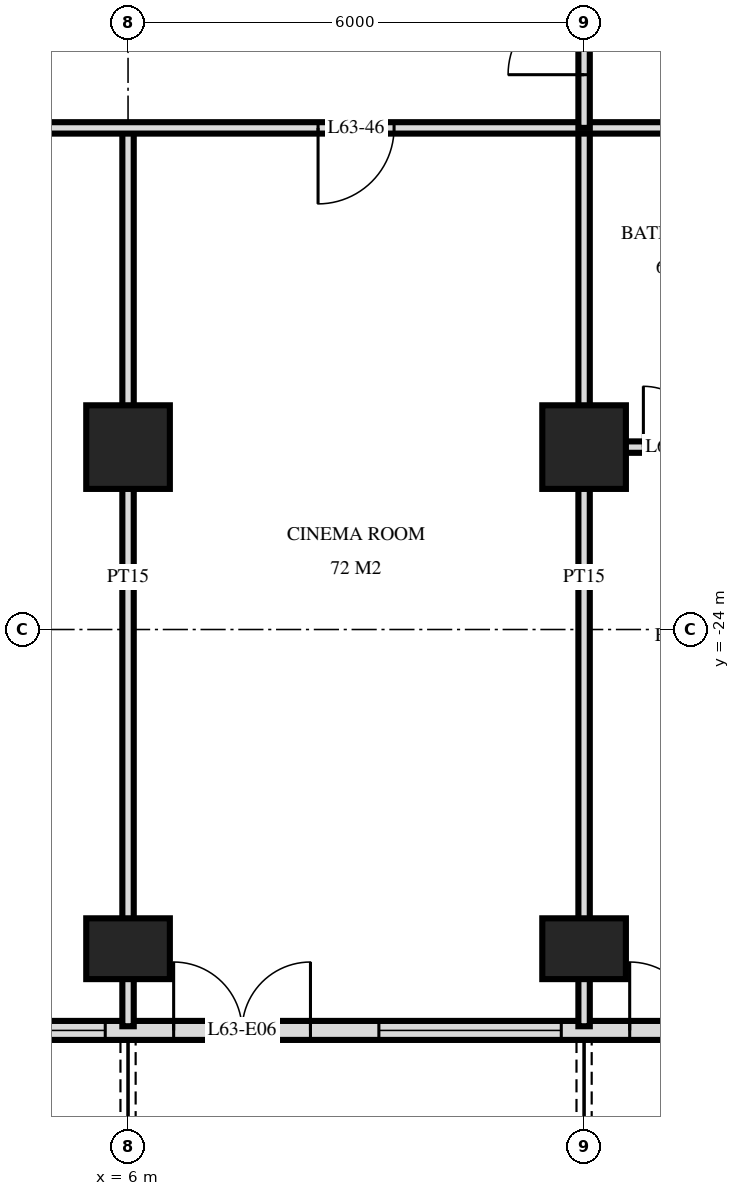
"""IFC4 building model, lengths in metres.
Left out: names, types, materials, properties, quantities, classifications, styles, units other than length and angle.
Written with IfcOpenShell. Run it as: python <this file> out.ifc"""

import sys

from ifc_helpers import new_model, si_unit, direction, frame, frame_2d, origin, origin_2d, place, context, subcontext, project, spatial, rectangle, extrude, element, fill, save


model = new_model("IFC4")
c1 = context("Model", 3, precision=1e-05, world=origin(), true_north=direction((0.0, 1.0)))
c2 = subcontext(c1, "Body", "Model", "MODEL_VIEW")
j1 = project(units=[si_unit("LENGTHUNIT", "METRE"), si_unit("PLANEANGLEUNIT", "RADIAN")], contexts=[c1])
p1 = place(None, origin())
s1 = spatial("IfcSite", under=j1, at=p1, CompositionType="ELEMENT")
p2 = place(p1, origin())
s2 = spatial("IfcBuilding", under=s1, at=p2, CompositionType="ELEMENT")
p3 = place(p2, frame((0.0, 0.0, 239.6)))
s3 = spatial("IfcBuildingStorey", under=s2, at=p3, CompositionType="ELEMENT", Elevation=239.6)
p4 = place(p3, frame((6.0, -28.2, 0.0), z_axis=(0.0, 0.0, 1.0), x_axis=(1.0, 0.0, 0.0)))
e1 = element("IfcColumn", 1, at=p4, inside=s3, PredefinedType="COLUMN", context=c2, shape_type="SweptSolid", body=[
    extrude(rectangle(XDim=1.1, YDim=0.8, at=origin_2d()), origin(), (0.0, 0.0, 1.0), 3.5),
])
p5 = place(p3, frame((6.0, -21.6, 0.0), z_axis=(0.0, 0.0, 1.0), x_axis=(1.0, 0.0, 0.0)))
e2 = element("IfcColumn", 2, at=p5, inside=s3, PredefinedType="COLUMN", context=c2, shape_type="SweptSolid", body=[
    extrude(rectangle(XDim=1.1, YDim=1.1, at=origin_2d()), origin(), (0.0, 0.0, 1.0), 3.5),
])
p6 = place(p3, frame((12.0, -28.2, 0.0), z_axis=(0.0, 0.0, 1.0), x_axis=(1.0, 0.0, 0.0)))
e3 = element("IfcColumn", 3, at=p6, inside=s3, PredefinedType="COLUMN", context=c2, shape_type="SweptSolid", body=[
    extrude(rectangle(XDim=1.1, YDim=0.8, at=origin_2d()), origin(), (0.0, 0.0, 1.0), 3.5),
])
p7 = place(p3, frame((12.0, -21.6, 0.0), z_axis=(0.0, 0.0, 1.0), x_axis=(1.0, 0.0, 0.0)))
e4 = element("IfcColumn", 4, at=p7, inside=s3, PredefinedType="COLUMN", context=c2, shape_type="SweptSolid", body=[
    extrude(rectangle(XDim=1.1, YDim=1.1, at=origin_2d()), origin(), (0.0, 0.0, 1.0), 3.5),
])
p8 = place(p3, frame((-22.475, -29.275, 0.0), z_axis=(0.0, 0.0, 1.0), x_axis=(1.0, 0.0, 0.0)))
e5 = element("IfcWall", 5, at=p8, inside=s3, PredefinedType="SOLIDWALL", context=c2, shape_type="SweptSolid", body=[
    extrude(rectangle(XDim=44.951, YDim=0.25, at=frame_2d((22.475, 0.0))), origin(), (0.0, 0.0, 1.0), 3.22),
])
p9 = place(p8, frame((0.575, 0.0, 0.0)))
e6 = element("IfcOpeningElement", 6, at=p9, cuts=e5, PredefinedType="OPENING", context=c2, shape_type="SweptSolid", body=[
    extrude(rectangle(XDim=1.8, YDim=2.4, at=frame_2d((0.9, 1.2))), frame((0.0, 0.135, 0.0), z_axis=(0.0, -1.0, 0.0), x_axis=(1.0, 0.0, 0.0)), (0.0, 0.0, 1.0), 0.27),
])
p10 = place(p8, frame((4.775, 0.0, 0.9)))
e7 = element("IfcOpeningElement", 7, at=p10, cuts=e5, PredefinedType="OPENING", context=c2, shape_type="SweptSolid", body=[
    extrude(rectangle(XDim=2.4, YDim=1.5, at=frame_2d((1.2, 0.75))), frame((0.0, 0.135, 0.0), z_axis=(0.0, -1.0, 0.0), x_axis=(1.0, 0.0, 0.0)), (0.0, 0.0, 1.0), 0.27),
])
p11 = place(p8, frame((8.075, 0.0, 0.0)))
e8 = element("IfcOpeningElement", 8, at=p11, cuts=e5, PredefinedType="OPENING", context=c2, shape_type="SweptSolid", body=[
    extrude(rectangle(XDim=1.8, YDim=2.4, at=frame_2d((0.9, 1.2))), frame((0.0, 0.135, 0.0), z_axis=(0.0, -1.0, 0.0), x_axis=(1.0, 0.0, 0.0)), (0.0, 0.0, 1.0), 0.27),
])
p12 = place(p8, frame((11.075, 0.0, 0.0)))
e9 = element("IfcOpeningElement", 9, at=p12, cuts=e5, PredefinedType="OPENING", context=c2, shape_type="SweptSolid", body=[
    extrude(rectangle(XDim=1.8, YDim=2.4, at=frame_2d((0.9, 1.2))), frame((0.0, 0.135, 0.0), z_axis=(0.0, -1.0, 0.0), x_axis=(1.0, 0.0, 0.0)), (0.0, 0.0, 1.0), 0.27),
])
p13 = place(p8, frame((13.775, 0.0, 0.9)))
e10 = element("IfcOpeningElement", 10, at=p13, cuts=e5, PredefinedType="OPENING", context=c2, shape_type="SweptSolid", body=[
    extrude(rectangle(XDim=2.4, YDim=1.5, at=frame_2d((1.2, 0.75))), frame((0.0, 0.135, 0.0), z_axis=(0.0, -1.0, 0.0), x_axis=(1.0, 0.0, 0.0)), (0.0, 0.0, 1.0), 0.27),
])
p14 = place(p8, frame((16.775, 0.0, 0.9)))
e11 = element("IfcOpeningElement", 11, at=p14, cuts=e5, PredefinedType="OPENING", context=c2, shape_type="SweptSolid", body=[
    extrude(rectangle(XDim=2.4, YDim=1.5, at=frame_2d((1.2, 0.75))), frame((0.0, 0.135, 0.0), z_axis=(0.0, -1.0, 0.0), x_axis=(1.0, 0.0, 0.0)), (0.0, 0.0, 1.0), 0.27),
])
p15 = place(p8, frame((20.075, 0.0, 0.0)))
e12 = element("IfcOpeningElement", 12, at=p15, cuts=e5, PredefinedType="OPENING", context=c2, shape_type="SweptSolid", body=[
    extrude(rectangle(XDim=1.8, YDim=2.4, at=frame_2d((0.9, 1.2))), frame((0.0, 0.135, 0.0), z_axis=(0.0, -1.0, 0.0), x_axis=(1.0, 0.0, 0.0)), (0.0, 0.0, 1.0), 0.27),
])
p16 = place(p8, frame((23.075, 0.0, 0.0)))
e13 = element("IfcOpeningElement", 13, at=p16, cuts=e5, PredefinedType="OPENING", context=c2, shape_type="SweptSolid", body=[
    extrude(rectangle(XDim=1.8, YDim=2.4, at=frame_2d((0.9, 1.2))), frame((0.0, 0.135, 0.0), z_axis=(0.0, -1.0, 0.0), x_axis=(1.0, 0.0, 0.0)), (0.0, 0.0, 1.0), 0.27),
])
p17 = place(p8, frame((25.775, 0.0, 0.9)))
e14 = element("IfcOpeningElement", 14, at=p17, cuts=e5, PredefinedType="OPENING", context=c2, shape_type="SweptSolid", body=[
    extrude(rectangle(XDim=2.4, YDim=1.5, at=frame_2d((1.2, 0.75))), frame((0.0, 0.135, 0.0), z_axis=(0.0, -1.0, 0.0), x_axis=(1.0, 0.0, 0.0)), (0.0, 0.0, 1.0), 0.27),
])
p18 = place(p8, frame((29.075, 0.0, 0.0)))
e15 = element("IfcOpeningElement", 15, at=p18, cuts=e5, PredefinedType="OPENING", context=c2, shape_type="SweptSolid", body=[
    extrude(rectangle(XDim=1.8, YDim=2.4, at=frame_2d((0.9, 1.2))), frame((0.0, 0.135, 0.0), z_axis=(0.0, -1.0, 0.0), x_axis=(1.0, 0.0, 0.0)), (0.0, 0.0, 1.0), 0.27),
])
p19 = place(p8, frame((31.775, 0.0, 0.9)))
e16 = element("IfcOpeningElement", 16, at=p19, cuts=e5, PredefinedType="OPENING", context=c2, shape_type="SweptSolid", body=[
    extrude(rectangle(XDim=2.4, YDim=1.5, at=frame_2d((1.2, 0.75))), frame((0.0, 0.135, 0.0), z_axis=(0.0, -1.0, 0.0), x_axis=(1.0, 0.0, 0.0)), (0.0, 0.0, 1.0), 0.27),
])
p20 = place(p8, frame((35.075, 0.0, 0.0)))
e17 = element("IfcOpeningElement", 17, at=p20, cuts=e5, PredefinedType="OPENING", context=c2, shape_type="SweptSolid", body=[
    extrude(rectangle(XDim=1.8, YDim=2.4, at=frame_2d((0.9, 1.2))), frame((0.0, 0.135, 0.0), z_axis=(0.0, -1.0, 0.0), x_axis=(1.0, 0.0, 0.0)), (0.0, 0.0, 1.0), 0.27),
])
p21 = place(p8, frame((41.075, 0.0, 0.0)))
e18 = element("IfcOpeningElement", 18, at=p21, cuts=e5, PredefinedType="OPENING", context=c2, shape_type="SweptSolid", body=[
    extrude(rectangle(XDim=1.8, YDim=2.4, at=frame_2d((0.9, 1.2))), frame((0.0, 0.135, 0.0), z_axis=(0.0, -1.0, 0.0), x_axis=(1.0, 0.0, 0.0)), (0.0, 0.0, 1.0), 0.27),
])
p22 = place(p3, frame((12.0, -17.4, 0.0), z_axis=(0.0, 0.0, 1.0), x_axis=(0.0, 1.0, 0.0)))
e19 = element("IfcWall", 19, at=p22, inside=s3, PredefinedType="PARTITIONING", context=c2, shape_type="SweptSolid", body=[
    extrude(rectangle(XDim=2.35, YDim=0.15, at=frame_2d((1.175, 0.0))), origin(), (0.0, 0.0, 1.0), 3.22),
])
p23 = place(p22, frame((0.7, 0.0, 0.0)))
e20 = element("IfcOpeningElement", 20, at=p23, cuts=e19, PredefinedType="OPENING", context=c2, shape_type="SweptSolid", body=[
    extrude(rectangle(XDim=1.0, YDim=2.1, at=frame_2d((0.5, 1.05))), frame((0.0, 0.085, 0.0), z_axis=(0.0, -1.0, 0.0), x_axis=(1.0, 0.0, 0.0)), (0.0, 0.0, 1.0), 0.17),
])
for number, where, z_axis, x_axis in (
    (21, (12.0, -29.22, 0.0), (0.0, 0.0, 1.0), (0.0, 1.0, 0.0)),
    (22, (6.0, -29.22, 0.0), (0.0, 0.0, 1.0), (0.0, 1.0, 0.0)),
):
    element("IfcWall", number, at=place(p3, frame(where, z_axis=z_axis, x_axis=x_axis)), inside=s3, PredefinedType="PARTITIONING", context=c2, shape_type="SweptSolid", body=[
        extrude(rectangle(XDim=11.82, YDim=0.15, at=frame_2d((5.91, 0.0))), origin(), (0.0, 0.0, 1.0), 3.22),
    ])
p24 = place(p3, frame((12.0, -21.6, 0.0), z_axis=(0.0, 0.0, 1.0), x_axis=(1.0, 0.0, 0.0)))
e23 = element("IfcWall", 23, at=p24, inside=s3, PredefinedType="PARTITIONING", context=c2, shape_type="SweptSolid", body=[
    extrude(rectangle(XDim=8.4, YDim=0.15, at=frame_2d((4.2, 0.0))), origin(), (0.0, 0.0, 1.0), 3.22),
])
p25 = place(p24, frame((0.78, 0.0, 0.0)))
e24 = element("IfcOpeningElement", 24, at=p25, cuts=e23, PredefinedType="OPENING", context=c2, shape_type="SweptSolid", body=[
    extrude(rectangle(XDim=0.8, YDim=2.1, at=frame_2d((0.4, 1.05))), frame((0.0, 0.085, 0.0), z_axis=(0.0, -1.0, 0.0), x_axis=(1.0, 0.0, 0.0)), (0.0, 0.0, 1.0), 0.17),
])
p26 = place(p24, frame((2.98, 0.0, 0.0)))
e25 = element("IfcOpeningElement", 25, at=p26, cuts=e23, PredefinedType="OPENING", context=c2, shape_type="SweptSolid", body=[
    extrude(rectangle(XDim=0.9, YDim=2.1, at=frame_2d((0.45, 1.05))), frame((0.0, 0.085, 0.0), z_axis=(0.0, -1.0, 0.0), x_axis=(1.0, 0.0, 0.0)), (0.0, 0.0, 1.0), 0.17),
])
p27 = place(p3, frame((-26.82, -17.4, 0.0), z_axis=(0.0, 0.0, 1.0), x_axis=(1.0, 0.0, 0.0)))
e26 = element("IfcWall", 26, at=p27, inside=s3, PredefinedType="PARTITIONING", context=c2, shape_type="SweptSolid", body=[
    extrude(rectangle(XDim=53.64, YDim=0.15, at=frame_2d((26.82, 0.0))), origin(), (0.0, 0.0, 1.0), 3.22),
])
p28 = place(p27, frame((11.97, 0.0, 0.0)))
e27 = element("IfcOpeningElement", 27, at=p28, cuts=e26, PredefinedType="OPENING", context=c2, shape_type="SweptSolid", body=[
    extrude(rectangle(XDim=1.0, YDim=2.1, at=frame_2d((0.5, 1.05))), frame((0.0, 0.085, 0.0), z_axis=(0.0, -1.0, 0.0), x_axis=(1.0, 0.0, 0.0)), (0.0, 0.0, 1.0), 0.17),
])
p29 = place(p27, frame((3.92, 0.0, 0.0)))
e28 = element("IfcOpeningElement", 28, at=p29, cuts=e26, PredefinedType="OPENING", context=c2, shape_type="SweptSolid", body=[
    extrude(rectangle(XDim=1.0, YDim=2.1, at=frame_2d((0.5, 1.05))), frame((0.0, 0.085, 0.0), z_axis=(0.0, -1.0, 0.0), x_axis=(1.0, 0.0, 0.0)), (0.0, 0.0, 1.0), 0.17),
])
p30 = place(p27, frame((5.72, 0.0, 0.0)))
e29 = element("IfcOpeningElement", 29, at=p30, cuts=e26, PredefinedType="OPENING", context=c2, shape_type="SweptSolid", body=[
    extrude(rectangle(XDim=1.0, YDim=2.1, at=frame_2d((0.5, 1.05))), frame((0.0, 0.085, 0.0), z_axis=(0.0, -1.0, 0.0), x_axis=(1.0, 0.0, 0.0)), (0.0, 0.0, 1.0), 0.17),
])
p31 = place(p27, frame((47.72, 0.0, 0.0)))
e30 = element("IfcOpeningElement", 30, at=p31, cuts=e26, PredefinedType="OPENING", context=c2, shape_type="SweptSolid", body=[
    extrude(rectangle(XDim=1.0, YDim=2.1, at=frame_2d((0.5, 1.05))), frame((0.0, 0.085, 0.0), z_axis=(0.0, -1.0, 0.0), x_axis=(1.0, 0.0, 0.0)), (0.0, 0.0, 1.0), 0.17),
])
p32 = place(p27, frame((51.02, 0.0, 0.0)))
e31 = element("IfcOpeningElement", 31, at=p32, cuts=e26, PredefinedType="OPENING", context=c2, shape_type="SweptSolid", body=[
    extrude(rectangle(XDim=1.0, YDim=2.1, at=frame_2d((0.5, 1.05))), frame((0.0, 0.085, 0.0), z_axis=(0.0, -1.0, 0.0), x_axis=(1.0, 0.0, 0.0)), (0.0, 0.0, 1.0), 0.17),
])
p33 = place(p27, frame((17.32, 0.0, 0.0)))
e32 = element("IfcOpeningElement", 32, at=p33, cuts=e26, PredefinedType="OPENING", context=c2, shape_type="SweptSolid", body=[
    extrude(rectangle(XDim=1.0, YDim=2.1, at=frame_2d((0.5, 1.05))), frame((0.0, 0.085, 0.0), z_axis=(0.0, -1.0, 0.0), x_axis=(1.0, 0.0, 0.0)), (0.0, 0.0, 1.0), 0.17),
])
p34 = place(p27, frame((23.32, 0.0, 0.0)))
e33 = element("IfcOpeningElement", 33, at=p34, cuts=e26, PredefinedType="OPENING", context=c2, shape_type="SweptSolid", body=[
    extrude(rectangle(XDim=1.0, YDim=2.1, at=frame_2d((0.5, 1.05))), frame((0.0, 0.085, 0.0), z_axis=(0.0, -1.0, 0.0), x_axis=(1.0, 0.0, 0.0)), (0.0, 0.0, 1.0), 0.17),
])
p35 = place(p27, frame((29.32, 0.0, 0.0)))
e34 = element("IfcOpeningElement", 34, at=p35, cuts=e26, PredefinedType="OPENING", context=c2, shape_type="SweptSolid", body=[
    extrude(rectangle(XDim=1.0, YDim=2.1, at=frame_2d((0.5, 1.05))), frame((0.0, 0.085, 0.0), z_axis=(0.0, -1.0, 0.0), x_axis=(1.0, 0.0, 0.0)), (0.0, 0.0, 1.0), 0.17),
])
p36 = place(p27, frame((35.32, 0.0, 0.0)))
e35 = element("IfcOpeningElement", 35, at=p36, cuts=e26, PredefinedType="OPENING", context=c2, shape_type="SweptSolid", body=[
    extrude(rectangle(XDim=1.0, YDim=2.1, at=frame_2d((0.5, 1.05))), frame((0.0, 0.085, 0.0), z_axis=(0.0, -1.0, 0.0), x_axis=(1.0, 0.0, 0.0)), (0.0, 0.0, 1.0), 0.17),
])
p37 = place(p17, origin())
e36 = element("IfcWindow", 36, at=p37, inside=s3, PartitioningType="SINGLE_PANEL", PredefinedType="WINDOW", context=c2, shape_type="SweptSolid", body=[
    extrude(rectangle(XDim=2.4, YDim=1.5, at=frame_2d((1.2, 0.75))), frame((0.0, 0.03, 0.0), z_axis=(0.0, -1.0, 0.0), x_axis=(1.0, 0.0, 0.0)), (0.0, 0.0, 1.0), 0.06),
])
fill(e14, e36)
p38 = place(p18, origin())
e37 = element("IfcDoor", 37, at=p38, inside=s3, OperationType="DOUBLE_DOOR_SINGLE_SWING", PredefinedType="DOOR", context=c2, shape_type="SweptSolid", body=[
    extrude(rectangle(XDim=1.8, YDim=2.4, at=frame_2d((0.9, 1.2))), frame((0.0, 0.025, 0.0), z_axis=(0.0, -1.0, 0.0), x_axis=(1.0, 0.0, 0.0)), (0.0, 0.0, 1.0), 0.05),
])
fill(e15, e37)
p39 = place(p19, origin())
e38 = element("IfcWindow", 38, at=p39, inside=s3, PartitioningType="SINGLE_PANEL", PredefinedType="WINDOW", context=c2, shape_type="SweptSolid", body=[
    extrude(rectangle(XDim=2.4, YDim=1.5, at=frame_2d((1.2, 0.75))), frame((0.0, 0.03, 0.0), z_axis=(0.0, -1.0, 0.0), x_axis=(1.0, 0.0, 0.0)), (0.0, 0.0, 1.0), 0.06),
])
fill(e16, e38)
p40 = place(p20, origin())
e39 = element("IfcDoor", 39, at=p40, inside=s3, OperationType="DOUBLE_DOOR_SINGLE_SWING", PredefinedType="DOOR", context=c2, shape_type="SweptSolid", body=[
    extrude(rectangle(XDim=1.8, YDim=2.4, at=frame_2d((0.9, 1.2))), frame((0.0, 0.025, 0.0), z_axis=(0.0, -1.0, 0.0), x_axis=(1.0, 0.0, 0.0)), (0.0, 0.0, 1.0), 0.05),
])
fill(e17, e39)
p41 = place(p23, origin())
e40 = element("IfcDoor", 40, at=p41, inside=s3, OperationType="SINGLE_SWING_RIGHT", PredefinedType="DOOR", context=c2, shape_type="SweptSolid", body=[
    extrude(rectangle(XDim=1.0, YDim=2.1, at=frame_2d((0.5, 1.05))), frame((0.0, 0.025, 0.0), z_axis=(0.0, -1.0, 0.0), x_axis=(1.0, 0.0, 0.0)), (0.0, 0.0, 1.0), 0.05),
])
fill(e20, e40)
p42 = place(p36, frame((0.5, 0.0, 0.0), z_axis=(0.0, 0.0, 1.0), x_axis=(-1.0, 0.0, 0.0)))
e41 = element("IfcDoor", 41, at=p42, inside=s3, OperationType="SINGLE_SWING_LEFT", PredefinedType="DOOR", context=c2, shape_type="SweptSolid", body=[
    extrude(rectangle(XDim=1.0, YDim=2.1, at=frame_2d((0.0, 1.05))), frame((0.0, -0.025, 0.0), z_axis=(0.0, 1.0, 0.0), x_axis=(-1.0, 0.0, 0.0)), (0.0, 0.0, 1.0), 0.05),
])
fill(e35, e41)
p43 = place(p25, origin())
e42 = element("IfcDoor", 42, at=p43, inside=s3, OperationType="SINGLE_SWING_RIGHT", PredefinedType="DOOR", context=c2, shape_type="SweptSolid", body=[
    extrude(rectangle(XDim=0.8, YDim=2.1, at=frame_2d((0.4, 1.05))), frame((0.0, 0.025, 0.0), z_axis=(0.0, -1.0, 0.0), x_axis=(1.0, 0.0, 0.0)), (0.0, 0.0, 1.0), 0.05),
])
fill(e24, e42)
save(model, sys.argv[1])
